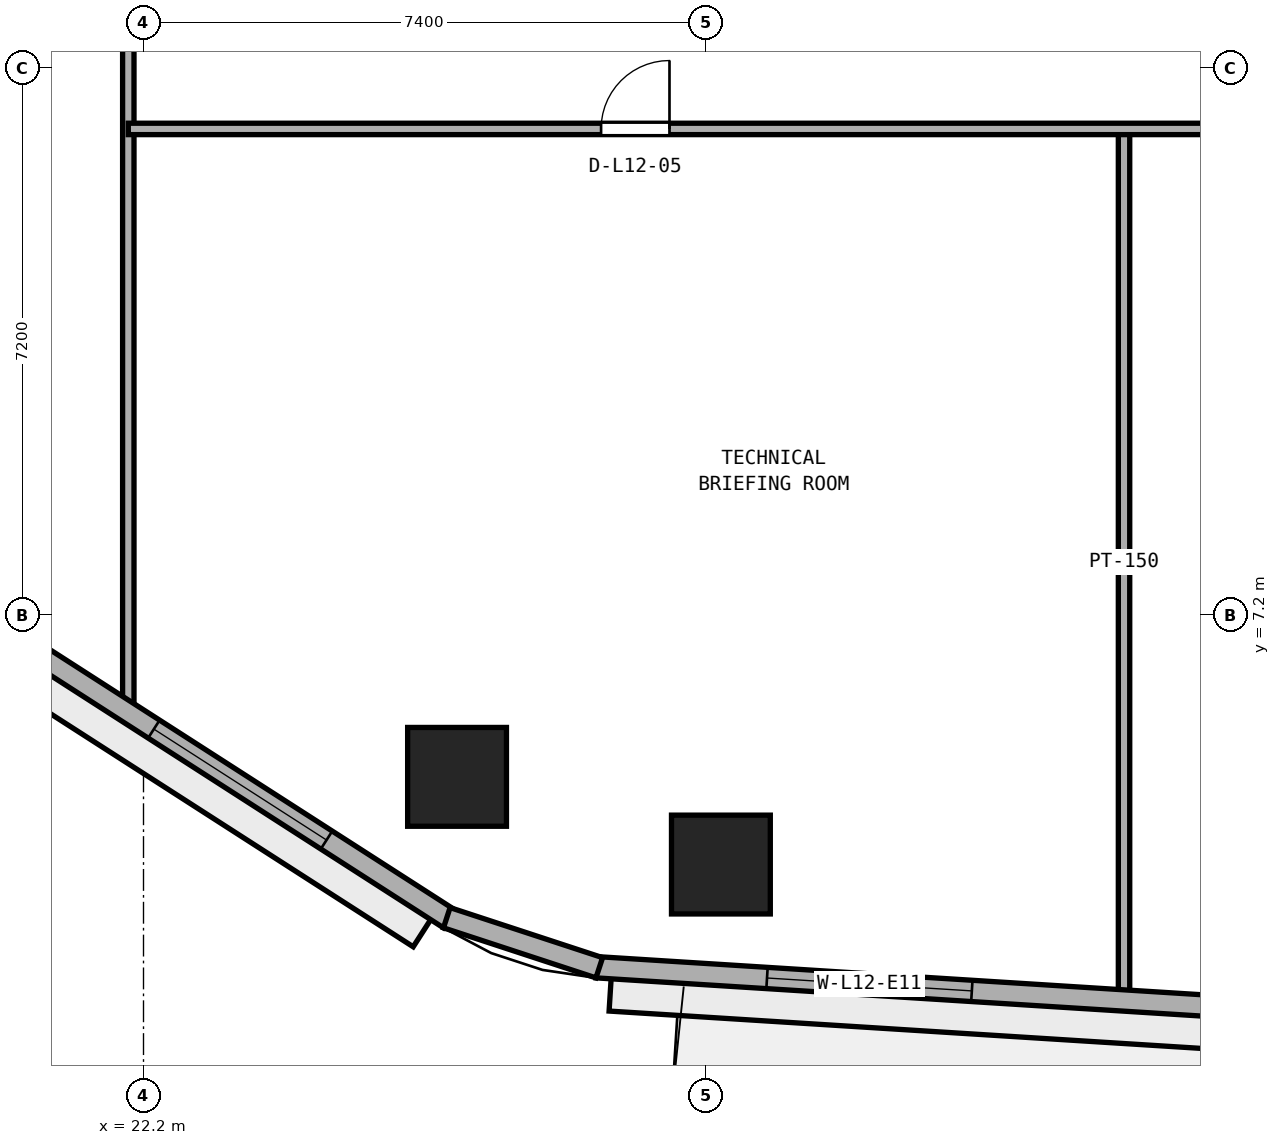
"""IFC4 building model, lengths in metres.
Left out: names, types, materials, properties, quantities, classifications, styles, units other than length and angle.
Written with IfcOpenShell. Run it as: python <this file> out.ifc"""

import sys

from ifc_helpers import new_model, si_unit, direction, frame, frame_2d, origin, origin_2d, place, context, subcontext, project, spatial, rectangle, extrude, element, fill, save


model = new_model("IFC4")
c1 = context("Model", 3, precision=1e-05, world=origin(), true_north=direction((0.0, 1.0)))
c2 = subcontext(c1, "Body", "Model", "MODEL_VIEW")
j1 = project(units=[si_unit("LENGTHUNIT", "METRE"), si_unit("PLANEANGLEUNIT", "RADIAN")], contexts=[c1])
p1 = place(None, origin())
s1 = spatial("IfcSite", under=j1, at=p1, CompositionType="ELEMENT")
p2 = place(p1, origin())
s2 = spatial("IfcBuilding", under=s1, at=p2, CompositionType="ELEMENT")
p3 = place(p2, frame((0.0, 0.0, 51.6)))
s3 = spatial("IfcBuildingStorey", under=s2, at=p3, CompositionType="ELEMENT", Elevation=51.6)
for number, where, z_axis, x_axis in (
    (1, (29.796, 3.922, 0.0), (0.0, 0.0, 1.0), (1.0, 0.0, 0.0)),
    (2, (26.325, 5.076, 0.0), (0.0, 0.0, 1.0), (1.0, 0.0, 0.0)),
):
    element("IfcColumn", number, at=place(p3, frame(where, z_axis=z_axis, x_axis=x_axis)), inside=s3, PredefinedType="COLUMN", context=c2, shape_type="SweptSolid", body=[
        extrude(rectangle(XDim=1.3, YDim=1.3, at=origin_2d()), origin(), (0.0, 0.0, 1.0), 3.8),
    ])
p4 = place(p3, frame((35.1, 2.198, 0.0), z_axis=(0.0, 0.0, 1.0), x_axis=(0.0, 1.0, 0.0)))
e3 = element("IfcWall", 3, at=p4, inside=s3, PredefinedType="PARTITIONING", context=c2, shape_type="SweptSolid", body=[
    extrude(rectangle(XDim=11.402, YDim=0.15, at=frame_2d((5.701, 0.0))), origin(), (0.0, 0.0, 1.0), 3.525),
])
p5 = place(p3, frame((22.0, 5.894, 0.0), z_axis=(0.0, 0.0, 1.0), x_axis=(0.0, 1.0, 0.0)))
e4 = element("IfcWall", 4, at=p5, inside=s3, PredefinedType="PARTITIONING", context=c2, shape_type="SweptSolid", body=[
    extrude(rectangle(XDim=30.906, YDim=0.15, at=frame_2d((15.453, 0.0))), origin(), (0.0, 0.0, 1.0), 3.525),
])
p6 = place(p5, frame((12.156, 0.0, 0.0)))
e5 = element("IfcOpeningElement", 5, at=p6, cuts=e4, PredefinedType="OPENING", context=c2, shape_type="SweptSolid", body=[
    extrude(rectangle(XDim=0.9, YDim=2.1, at=frame_2d((0.45, 1.05))), frame((0.0, 0.085, 0.0), z_axis=(0.0, -1.0, 0.0), x_axis=(1.0, 0.0, 0.0)), (0.0, 0.0, 1.0), 0.17),
])
p7 = place(p5, frame((20.806, 0.0, 0.0)))
e6 = element("IfcOpeningElement", 6, at=p7, cuts=e4, PredefinedType="OPENING", context=c2, shape_type="SweptSolid", body=[
    extrude(rectangle(XDim=0.9, YDim=2.1, at=frame_2d((0.45, 1.05))), frame((0.0, 0.085, 0.0), z_axis=(0.0, -1.0, 0.0), x_axis=(1.0, 0.0, 0.0)), (0.0, 0.0, 1.0), 0.17),
])
p8 = place(p5, frame((25.731, 0.0, 0.0)))
e7 = element("IfcOpeningElement", 7, at=p8, cuts=e4, PredefinedType="OPENING", context=c2, shape_type="SweptSolid", body=[
    extrude(rectangle(XDim=1.0, YDim=2.12, at=frame_2d((0.5, 1.06))), frame((0.0, 0.085, 0.0), z_axis=(0.0, -1.0, 0.0), x_axis=(1.0, 0.0, 0.0)), (0.0, 0.0, 1.0), 0.17),
])
p9 = place(p3, frame((22.0, 13.6, 0.0), z_axis=(0.0, 0.0, 1.0), x_axis=(1.0, 0.0, 0.0)))
e8 = element("IfcWall", 8, at=p9, inside=s3, PredefinedType="PARTITIONING", context=c2, shape_type="SweptSolid", body=[
    extrude(rectangle(XDim=30.0, YDim=0.15, at=frame_2d((15.0, 0.0))), origin(), (0.0, 0.0, 1.0), 3.525),
])
p10 = place(p9, frame((6.22, 0.0, 0.0)))
e9 = element("IfcOpeningElement", 9, at=p10, cuts=e8, PredefinedType="OPENING", context=c2, shape_type="SweptSolid", body=[
    extrude(rectangle(XDim=0.9, YDim=2.1, at=frame_2d((0.45, 1.05))), frame((0.0, 0.085, 0.0), z_axis=(0.0, -1.0, 0.0), x_axis=(1.0, 0.0, 0.0)), (0.0, 0.0, 1.0), 0.17),
])
p11 = place(p9, frame((20.98, 0.0, 0.0)))
e10 = element("IfcOpeningElement", 10, at=p11, cuts=e8, PredefinedType="OPENING", context=c2, shape_type="SweptSolid", body=[
    extrude(rectangle(XDim=0.9, YDim=2.1, at=frame_2d((0.45, 1.05))), frame((0.0, 0.085, 0.0), z_axis=(0.0, -1.0, 0.0), x_axis=(1.0, 0.0, 0.0)), (0.0, 0.0, 1.0), 0.17),
])
p12 = place(p3, frame((28.161, 2.571, 0.0), z_axis=(0.0, 0.0, 1.0), x_axis=(0.998017288298, -0.06294038654, 0.0)))
e11 = element("IfcWall", 11, at=p12, inside=s3, PredefinedType="STANDARD", context=c2, shape_type="SweptSolid", body=[
    extrude(rectangle(XDim=19.577, YDim=0.28, at=frame_2d((9.789, 0.0))), origin(), (0.0, 0.0, 1.0), 3.525),
])
p13 = place(p12, frame((9.239, 0.0, 0.0)))
e12 = element("IfcOpeningElement", 12, at=p13, cuts=e11, PredefinedType="OPENING", context=c2, shape_type="SweptSolid", body=[
    extrude(rectangle(XDim=1.1, YDim=2.2, at=frame_2d((0.55, 1.1))), frame((0.0, 0.15, 0.0), z_axis=(0.0, -1.0, 0.0), x_axis=(1.0, 0.0, 0.0)), (0.0, 0.0, 1.0), 0.3),
])
p14 = place(p12, frame((2.246, 0.0, 0.9)))
e13 = element("IfcOpeningElement", 13, at=p14, cuts=e11, PredefinedType="OPENING", context=c2, shape_type="SweptSolid", body=[
    extrude(rectangle(XDim=2.7, YDim=1.75, at=frame_2d((1.35, 0.875))), frame((0.0, 0.15, 0.0), z_axis=(0.0, -1.0, 0.0), x_axis=(1.0, 0.0, 0.0)), (0.0, 0.0, 1.0), 0.3),
])
p15 = place(p12, frame((14.631, 0.0, 0.9)))
e14 = element("IfcOpeningElement", 14, at=p15, cuts=e11, PredefinedType="OPENING", context=c2, shape_type="SweptSolid", body=[
    extrude(rectangle(XDim=2.7, YDim=1.75, at=frame_2d((1.35, 0.875))), frame((0.0, 0.15, 0.0), z_axis=(0.0, -1.0, 0.0), x_axis=(1.0, 0.0, 0.0)), (0.0, 0.0, 1.0), 0.3),
])
p16 = place(p3, frame((11.405, 12.728, 0.0), z_axis=(0.0, 0.0, 1.0), x_axis=(0.841304564637, -0.540561402175, 0.0)))
e15 = element("IfcWall", 15, at=p16, inside=s3, PredefinedType="STANDARD", context=c2, shape_type="SweptSolid", body=[
    extrude(rectangle(XDim=17.612, YDim=0.28, at=frame_2d((8.806, 0.0))), origin(), (0.0, 0.0, 1.0), 3.525),
])
p17 = place(p16, frame((1.919, 0.0, 0.9)))
e16 = element("IfcOpeningElement", 16, at=p17, cuts=e15, PredefinedType="OPENING", context=c2, shape_type="SweptSolid", body=[
    extrude(rectangle(XDim=2.7, YDim=1.75, at=frame_2d((1.35, 0.875))), frame((0.0, 0.15, 0.0), z_axis=(0.0, -1.0, 0.0), x_axis=(1.0, 0.0, 0.0)), (0.0, 0.0, 1.0), 0.3),
])
p18 = place(p16, frame((7.456, 0.0, 0.9)))
e17 = element("IfcOpeningElement", 17, at=p18, cuts=e15, PredefinedType="OPENING", context=c2, shape_type="SweptSolid", body=[
    extrude(rectangle(XDim=2.7, YDim=1.75, at=frame_2d((1.35, 0.875))), frame((0.0, 0.15, 0.0), z_axis=(0.0, -1.0, 0.0), x_axis=(1.0, 0.0, 0.0)), (0.0, 0.0, 1.0), 0.3),
])
p19 = place(p16, frame((12.993, 0.0, 0.9)))
e18 = element("IfcOpeningElement", 18, at=p19, cuts=e15, PredefinedType="OPENING", context=c2, shape_type="SweptSolid", body=[
    extrude(rectangle(XDim=2.7, YDim=1.75, at=frame_2d((1.35, 0.875))), frame((0.0, 0.15, 0.0), z_axis=(0.0, -1.0, 0.0), x_axis=(1.0, 0.0, 0.0)), (0.0, 0.0, 1.0), 0.3),
])
p20 = place(p3, frame((26.19, 3.223, 0.0), z_axis=(0.0, 0.0, 1.0), x_axis=(0.95016442175, -0.311749212734, 0.0)))
e19 = element("IfcWall", 19, at=p20, inside=s3, PredefinedType="STANDARD", context=c2, shape_type="SweptSolid", body=[
    extrude(rectangle(XDim=2.111, YDim=0.28, at=frame_2d((1.056, 0.0))), origin(), (0.0, 0.0, 1.0), 3.525),
])
p21 = place(p10, origin())
e20 = element("IfcDoor", 20, at=p21, inside=s3, OperationType="SINGLE_SWING_RIGHT", PredefinedType="DOOR", context=c2, shape_type="SweptSolid", body=[
    extrude(rectangle(XDim=0.9, YDim=2.1, at=frame_2d((0.45, 1.05))), frame((0.0, 0.025, 0.0), z_axis=(0.0, -1.0, 0.0), x_axis=(1.0, 0.0, 0.0)), (0.0, 0.0, 1.0), 0.05),
])
fill(e9, e20)
p22 = place(p14, origin())
e21 = element("IfcWindow", 21, at=p22, inside=s3, PartitioningType="SINGLE_PANEL", PredefinedType="WINDOW", context=c2, shape_type="SweptSolid", body=[
    extrude(rectangle(XDim=2.7, YDim=1.75, at=frame_2d((1.35, 0.875))), frame((0.0, 0.03, 0.0), z_axis=(0.0, -1.0, 0.0), x_axis=(1.0, 0.0, 0.0)), (0.0, 0.0, 1.0), 0.06),
])
fill(e13, e21)
p23 = place(p19, origin())
e22 = element("IfcWindow", 22, at=p23, inside=s3, PartitioningType="SINGLE_PANEL", PredefinedType="WINDOW", context=c2, shape_type="SweptSolid", body=[
    extrude(rectangle(XDim=2.7, YDim=1.75, at=frame_2d((1.35, 0.875))), frame((0.0, 0.03, 0.0), z_axis=(0.0, -1.0, 0.0), x_axis=(1.0, 0.0, 0.0)), (0.0, 0.0, 1.0), 0.06),
])
fill(e18, e22)
save(model, sys.argv[1])
